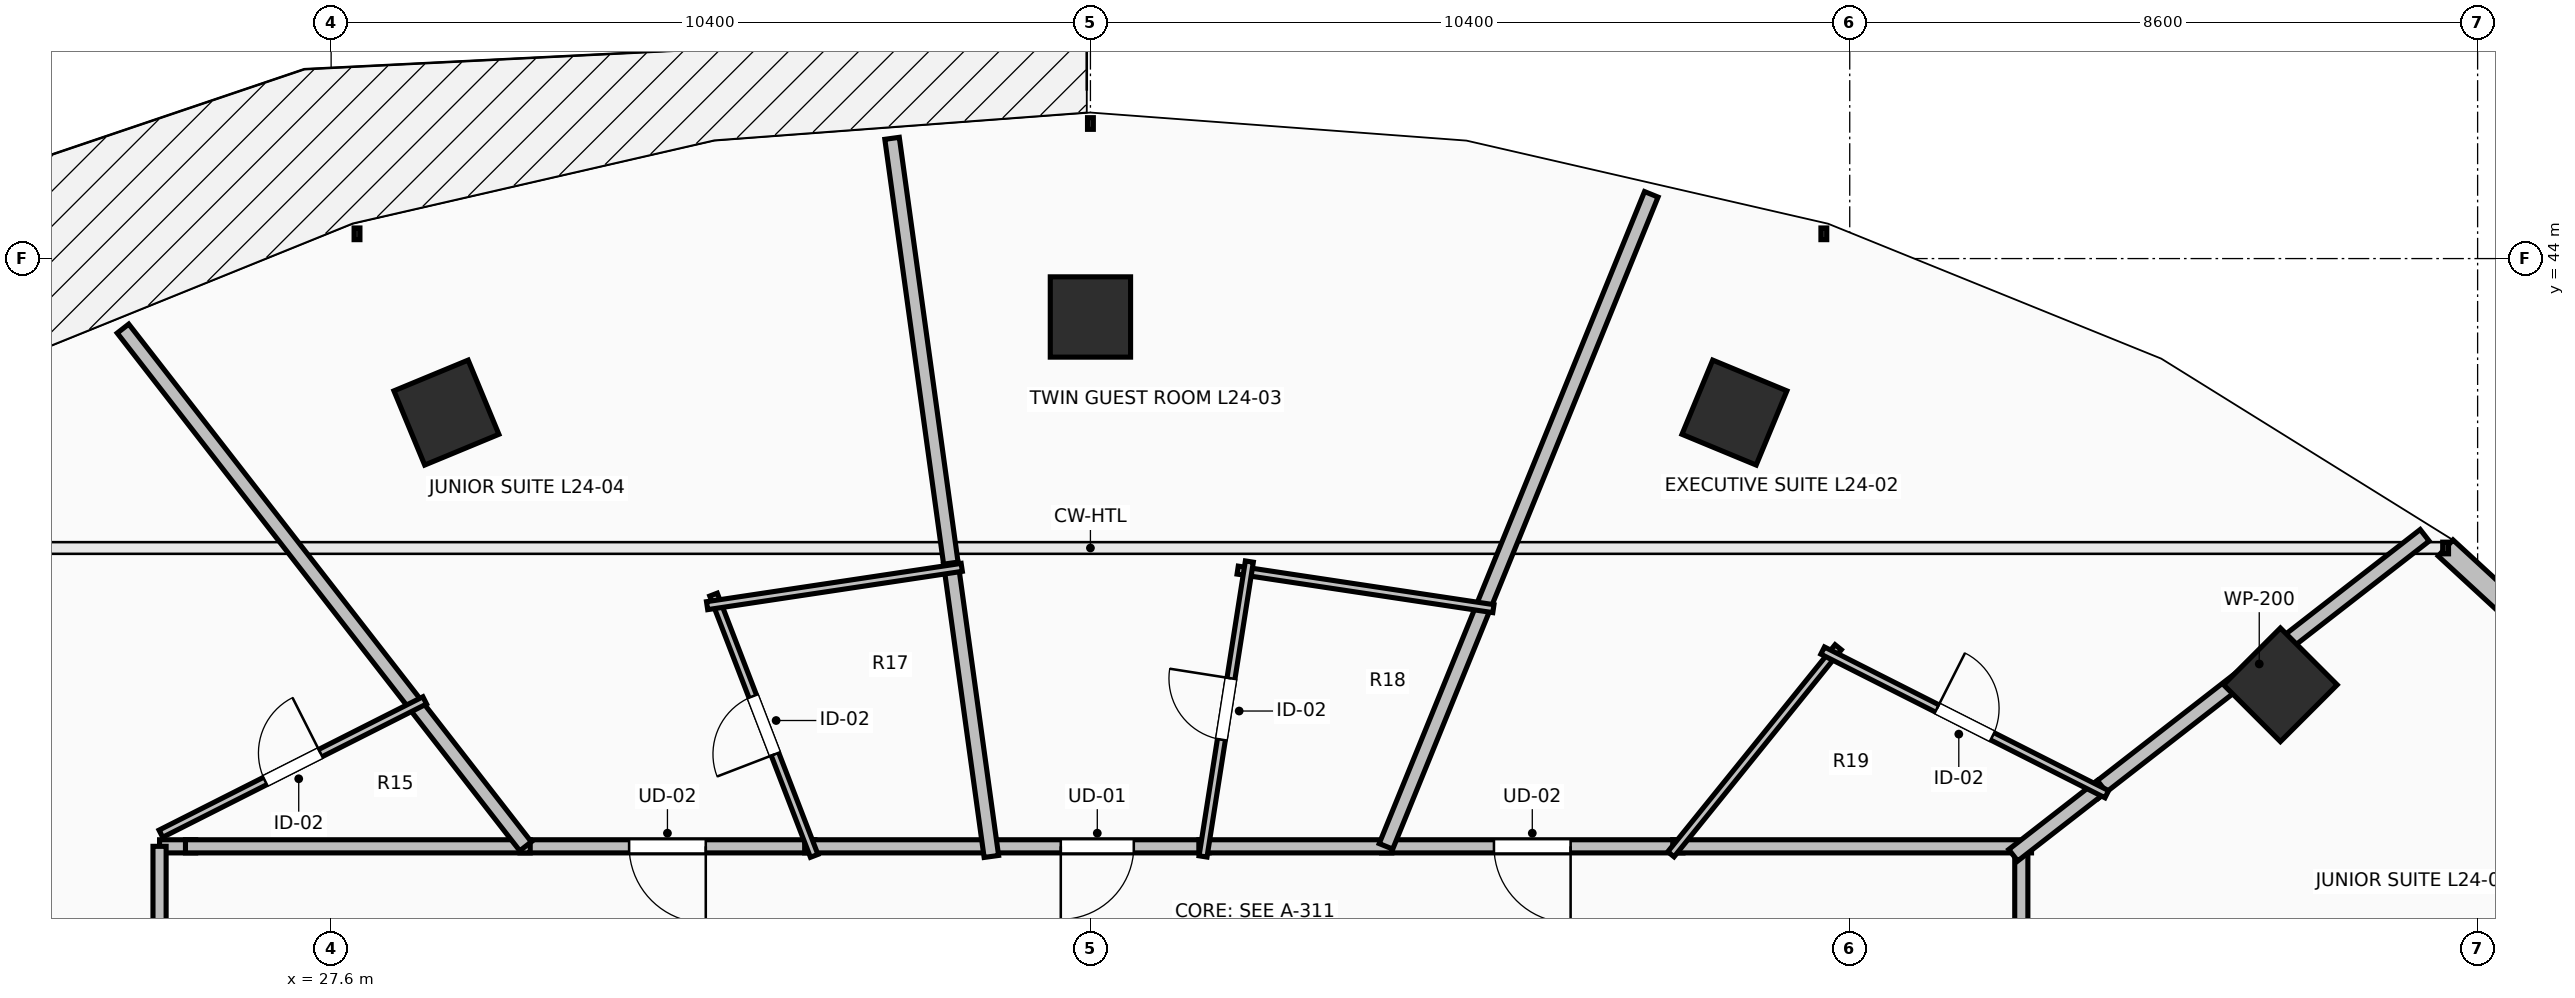
"""IFC4 building model, lengths in metres.
Left out: names, types, materials, properties, quantities, classifications, styles, units other than length and angle.
Written with IfcOpenShell. Run it as: python <this file> out.ifc"""

import sys

from ifc_helpers import new_model, si_unit, direction, frame, frame_2d, origin, origin_2d, place, context, subcontext, project, spatial, rectangle, extrude, element, fill, save


model = new_model("IFC4")
c1 = context("Model", 3, precision=1e-05, world=origin(), true_north=direction((0.0, 1.0)))
c2 = subcontext(c1, "Body", "Model", "MODEL_VIEW")
j1 = project(units=[si_unit("LENGTHUNIT", "METRE"), si_unit("PLANEANGLEUNIT", "RADIAN")], contexts=[c1])
p1 = place(None, origin())
s1 = spatial("IfcSite", under=j1, at=p1, CompositionType="ELEMENT")
p2 = place(p1, origin())
s2 = spatial("IfcBuilding", under=s1, at=p2, CompositionType="ELEMENT")
p3 = place(p2, frame((0.0, 0.0, 92.8)))
s3 = spatial("IfcBuildingStorey", under=s2, at=p3, CompositionType="ELEMENT", Elevation=92.8)
for number, where, z_axis, x_axis in (
    (1, (54.299, 38.162, 0.0), (0.0, 0.0, 1.0), (0.707, 0.707, 0.0)),
    (2, (46.821, 41.891, 0.0), (0.0, 0.0, 1.0), (0.383, 0.924, 0.0)),
    (3, (38.0, 43.2, 0.0), (0.0, 0.0, 1.0), (0.0, 1.0, 0.0)),
    (4, (29.179, 41.891, 0.0), (0.0, 0.0, 1.0), (-0.383, 0.924, 0.0)),
):
    element("IfcColumn", number, at=place(p3, frame(where, z_axis=z_axis, x_axis=x_axis)), inside=s3, PredefinedType="COLUMN", context=c2, shape_type="SweptSolid", body=[
        extrude(rectangle(XDim=1.1, YDim=1.1, at=origin_2d()), origin(), (0.0, 0.0, 1.0), 3.5),
    ])
p4 = place(p3, frame((59.826, 37.028, 0.0), z_axis=(0.0, 0.0, 1.0), x_axis=(-0.735416718093, 0.677615119924, 0.0)))
e5 = element("IfcWall", 5, at=p4, inside=s3, PredefinedType="STANDARD", context=c2, shape_type="SweptSolid", body=[
    extrude(rectangle(XDim=4.439, YDim=0.3, at=frame_2d((2.22, 0.0))), origin(), (0.0, 0.0, 1.0), 3.24),
])
p5 = place(p4, frame((1.32, 0.0, 0.85)))
e6 = element("IfcOpeningElement", 6, at=p5, cuts=e5, PredefinedType="OPENING", context=c2, shape_type="SweptSolid", body=[
    extrude(rectangle(XDim=1.8, YDim=2.19, at=frame_2d((0.9, 1.095))), frame((0.0, 0.165, 0.0), z_axis=(0.0, -1.0, 0.0), x_axis=(1.0, 0.0, 0.0)), (0.0, 0.0, 1.0), 0.33),
])
p6 = place(p3, frame((50.75, 30.853, 0.0), z_axis=(0.0, 0.0, 1.0), x_axis=(0.0, 1.0, 0.0)))
e7 = element("IfcWall", 7, at=p6, inside=s3, PredefinedType="PARTITIONING", context=c2, shape_type="SweptSolid", body=[
    extrude(rectangle(XDim=5.097, YDim=0.18, at=frame_2d((2.548, 0.0))), origin(), (0.0, 0.0, 1.0), 2.432),
])
p7 = place(p6, frame((2.023, 0.0, 0.0)))
e8 = element("IfcOpeningElement", 8, at=p7, cuts=e7, PredefinedType="OPENING", context=c2, shape_type="SweptSolid", body=[
    extrude(rectangle(XDim=1.05, YDim=2.2, at=frame_2d((0.525, 1.1))), frame((0.0, 0.105, 0.0), z_axis=(0.0, -1.0, 0.0), x_axis=(1.0, 0.0, 0.0)), (0.0, 0.0, 1.0), 0.21),
])
p8 = place(p3, frame((46.116, 35.95, 0.0), z_axis=(0.0, 0.0, 1.0), x_axis=(-1.0, 0.0, 0.0)))
e9 = element("IfcWall", 9, at=p8, inside=s3, PredefinedType="PARTITIONING", context=c2, shape_type="SweptSolid", body=[
    extrude(rectangle(XDim=4.128, YDim=0.18, at=frame_2d((2.064, 0.0))), origin(), (0.0, 0.0, 1.0), 2.972),
])
p9 = place(p8, frame((1.539, 0.0, 0.0)))
e10 = element("IfcOpeningElement", 10, at=p9, cuts=e9, PredefinedType="OPENING", context=c2, shape_type="SweptSolid", body=[
    extrude(rectangle(XDim=1.05, YDim=2.2, at=frame_2d((0.525, 1.1))), frame((0.0, 0.105, 0.0), z_axis=(0.0, -1.0, 0.0), x_axis=(1.0, 0.0, 0.0)), (0.0, 0.0, 1.0), 0.21),
])
p10 = place(p3, frame((50.89, 35.95, 0.0), z_axis=(0.0, 0.0, 1.0), x_axis=(-1.0, 0.0, 0.0)))
e11 = element("IfcWall", 11, at=p10, inside=s3, PredefinedType="PARTITIONING", context=c2, shape_type="SweptSolid", body=[
    extrude(rectangle(XDim=4.914, YDim=0.18, at=frame_2d((2.457, 0.0))), origin(), (0.0, 0.0, 1.0), 2.432),
])
p11 = place(p3, frame((39.625, 35.95, 0.0), z_axis=(0.0, 0.0, 1.0), x_axis=(-1.0, 0.0, 0.0)))
e12 = element("IfcWall", 12, at=p11, inside=s3, PredefinedType="PARTITIONING", context=c2, shape_type="SweptSolid", body=[
    extrude(rectangle(XDim=3.062, YDim=0.18, at=frame_2d((1.531, 0.0))), origin(), (0.0, 0.0, 1.0), 2.972),
])
p12 = place(p11, frame((1.031, 0.0, 0.0)))
e13 = element("IfcOpeningElement", 13, at=p12, cuts=e12, PredefinedType="OPENING", context=c2, shape_type="SweptSolid", body=[
    extrude(rectangle(XDim=1.0, YDim=2.15, at=frame_2d((0.5, 1.075))), frame((0.0, 0.105, 0.0), z_axis=(0.0, -1.0, 0.0), x_axis=(1.0, 0.0, 0.0)), (0.0, 0.0, 1.0), 0.21),
])
p13 = place(p3, frame((42.128, 35.95, 0.0), z_axis=(0.0, 0.0, 1.0), x_axis=(-1.0, 0.0, 0.0)))
e14 = element("IfcWall", 14, at=p13, inside=s3, PredefinedType="PARTITIONING", context=c2, shape_type="SweptSolid", body=[
    extrude(rectangle(XDim=2.643, YDim=0.18, at=frame_2d((1.321, 0.0))), origin(), (0.0, 0.0, 1.0), 2.972),
])
p14 = place(p3, frame((34.226, 35.95, 0.0), z_axis=(0.0, 0.0, 1.0), x_axis=(-1.0, 0.0, 0.0)))
e15 = element("IfcWall", 15, at=p14, inside=s3, PredefinedType="PARTITIONING", context=c2, shape_type="SweptSolid", body=[
    extrude(rectangle(XDim=4.039, YDim=0.18, at=frame_2d((2.02, 0.0))), origin(), (0.0, 0.0, 1.0), 2.432),
])
p15 = place(p14, frame((1.494, 0.0, 0.0)))
e16 = element("IfcOpeningElement", 16, at=p15, cuts=e15, PredefinedType="OPENING", context=c2, shape_type="SweptSolid", body=[
    extrude(rectangle(XDim=1.05, YDim=2.2, at=frame_2d((0.525, 1.1))), frame((0.0, 0.105, 0.0), z_axis=(0.0, -1.0, 0.0), x_axis=(1.0, 0.0, 0.0)), (0.0, 0.0, 1.0), 0.21),
])
p16 = place(p3, frame((36.703, 35.95, 0.0), z_axis=(0.0, 0.0, 1.0), x_axis=(-1.0, 0.0, 0.0)))
e17 = element("IfcWall", 17, at=p16, inside=s3, PredefinedType="PARTITIONING", context=c2, shape_type="SweptSolid", body=[
    extrude(rectangle(XDim=2.617, YDim=0.18, at=frame_2d((1.309, 0.0))), origin(), (0.0, 0.0, 1.0), 2.972),
])
p17 = place(p3, frame((25.745, 35.95, 0.0), z_axis=(0.0, 0.0, 1.0), x_axis=(-1.0, 0.0, 0.0)))
e18 = element("IfcWall", 18, at=p17, inside=s3, PredefinedType="PARTITIONING", context=c2, shape_type="SweptSolid", body=[
    extrude(rectangle(XDim=0.495, YDim=0.18, at=frame_2d((0.248, 0.0))), origin(), (0.0, 0.0, 1.0), 3.24),
])
p18 = place(p3, frame((25.25, 35.95, 0.0), z_axis=(0.0, 0.0, 1.0), x_axis=(0.0, -1.0, 0.0)))
e19 = element("IfcWall", 19, at=p18, inside=s3, PredefinedType="PARTITIONING", context=c2, shape_type="SweptSolid", body=[
    extrude(rectangle(XDim=4.822, YDim=0.18, at=frame_2d((2.411, 0.0))), origin(), (0.0, 0.0, 1.0), 2.432),
])
p19 = place(p18, frame((1.886, 0.0, 0.0)))
e20 = element("IfcOpeningElement", 20, at=p19, cuts=e19, PredefinedType="OPENING", context=c2, shape_type="SweptSolid", body=[
    extrude(rectangle(XDim=1.05, YDim=2.2, at=frame_2d((0.525, 1.1))), frame((0.0, 0.105, 0.0), z_axis=(0.0, -1.0, 0.0), x_axis=(1.0, 0.0, 0.0)), (0.0, 0.0, 1.0), 0.21),
])
p20 = place(p3, frame((30.327, 35.95, 0.0), z_axis=(0.0, 0.0, 1.0), x_axis=(-1.0, 0.0, 0.0)))
e21 = element("IfcWall", 21, at=p20, inside=s3, PredefinedType="PARTITIONING", context=c2, shape_type="SweptSolid", body=[
    extrude(rectangle(XDim=4.722, YDim=0.18, at=frame_2d((2.361, 0.0))), origin(), (0.0, 0.0, 1.0), 2.432),
])
p21 = place(p3, frame((56.275, 40.21, 0.0), z_axis=(0.0, 0.0, 1.0), x_axis=(-0.78943235806, -0.613837561614, 0.0)))
e22 = element("IfcWall", 22, at=p21, inside=s3, PredefinedType="PARTITIONING", context=c2, shape_type="SweptSolid", body=[
    extrude(rectangle(XDim=5.741, YDim=0.2, at=frame_2d((2.87, 0.0))), origin(), (0.0, 0.0, 1.0), 2.677),
])
p22 = place(p3, frame((51.854, 36.772, 0.0), z_axis=(0.0, 0.0, 1.0), x_axis=(-0.789420593357, -0.613852691436, 0.0)))
e23 = element("IfcWall", 23, at=p22, inside=s3, PredefinedType="PARTITIONING", context=c2, shape_type="SweptSolid", body=[
    extrude(rectangle(XDim=1.538, YDim=0.2, at=frame_2d((0.769, 0.0))), origin(), (0.0, 0.0, 1.0), 2.922),
])
p23 = place(p3, frame((45.951, 35.841, 0.0), z_axis=(0.0, 0.0, 1.0), x_axis=(0.628411924203, 0.77788074505, 0.0)))
e24 = element("IfcWall", 24, at=p23, inside=s3, PredefinedType="PARTITIONING", context=c2, shape_type="SweptSolid", body=[
    extrude(rectangle(XDim=3.646, YDim=0.11, at=frame_2d((1.823, 0.0))), origin(), (0.0, 0.0, 1.0), 2.432),
])
p24 = place(p3, frame((48.029, 38.631, 0.0), z_axis=(0.0, 0.0, 1.0), x_axis=(0.892459125519, -0.451128262558, 0.0)))
e25 = element("IfcWall", 25, at=p24, inside=s3, PredefinedType="PARTITIONING", context=c2, shape_type="SweptSolid", body=[
    extrude(rectangle(XDim=4.361, YDim=0.11, at=frame_2d((2.18, 0.0))), origin(), (0.0, 0.0, 1.0), 3.24),
])
p25 = place(p24, frame((1.755, 0.0, 0.0)))
e26 = element("IfcOpeningElement", 26, at=p25, cuts=e25, PredefinedType="OPENING", context=c2, shape_type="SweptSolid", body=[
    extrude(rectangle(XDim=0.85, YDim=2.1, at=frame_2d((0.425, 1.05))), frame((0.0, 0.07, 0.0), z_axis=(0.0, -1.0, 0.0), x_axis=(1.0, 0.0, 0.0)), (0.0, 0.0, 1.0), 0.14),
])
p26 = place(p3, frame((45.682, 44.88, 0.0), z_axis=(0.0, 0.0, 1.0), x_axis=(-0.376911553655, -0.9262492541, 0.0)))
e27 = element("IfcWall", 27, at=p26, inside=s3, PredefinedType="PARTITIONING", context=c2, shape_type="SweptSolid", body=[
    extrude(rectangle(XDim=9.641, YDim=0.2, at=frame_2d((4.82, 0.0))), origin(), (0.0, 0.0, 1.0), 2.677),
])
p27 = place(p3, frame((40.017, 39.733, 0.0), z_axis=(0.0, 0.0, 1.0), x_axis=(0.988835521732, -0.149011110196, 0.0)))
e28 = element("IfcWall", 28, at=p27, inside=s3, PredefinedType="PARTITIONING", context=c2, shape_type="SweptSolid", body=[
    extrude(rectangle(XDim=3.542, YDim=0.11, at=frame_2d((1.771, 0.0))), origin(), (0.0, 0.0, 1.0), 3.24),
])
p28 = place(p3, frame((39.542, 35.812, 0.0), z_axis=(0.0, 0.0, 1.0), x_axis=(0.155211191462, 0.98788131172, 0.0)))
e29 = element("IfcWall", 29, at=p28, inside=s3, PredefinedType="PARTITIONING", context=c2, shape_type="SweptSolid", body=[
    extrude(rectangle(XDim=4.088, YDim=0.11, at=frame_2d((2.044, 0.0))), origin(), (0.0, 0.0, 1.0), 2.922),
])
p29 = place(p28, frame((1.619, 0.0, 0.0)))
e30 = element("IfcOpeningElement", 30, at=p29, cuts=e29, PredefinedType="OPENING", context=c2, shape_type="SweptSolid", body=[
    extrude(rectangle(XDim=0.85, YDim=2.1, at=frame_2d((0.425, 1.05))), frame((0.0, 0.07, 0.0), z_axis=(0.0, -1.0, 0.0), x_axis=(1.0, 0.0, 0.0)), (0.0, 0.0, 1.0), 0.14),
])
p30 = place(p3, frame((35.283, 45.647, 0.0), z_axis=(0.0, 0.0, 1.0), x_axis=(0.137015172239, -0.990568948926, 0.0)))
e31 = element("IfcWall", 31, at=p30, inside=s3, PredefinedType="PARTITIONING", context=c2, shape_type="SweptSolid", body=[
    extrude(rectangle(XDim=6.014, YDim=0.2, at=frame_2d((3.007, 0.0))), origin(), (0.0, 0.0, 1.0), 2.432),
])
p31 = place(p3, frame((36.087, 39.829, 0.0), z_axis=(0.0, 0.0, 1.0), x_axis=(0.137071274589, -0.990561187248, 0.0)))
e32 = element("IfcWall", 32, at=p31, inside=s3, PredefinedType="PARTITIONING", context=c2, shape_type="SweptSolid", body=[
    extrude(rectangle(XDim=4.056, YDim=0.2, at=frame_2d((2.028, 0.0))), origin(), (0.0, 0.0, 1.0), 2.922),
])
p32 = place(p3, frame((34.216, 35.819, 0.0), z_axis=(0.0, 0.0, 1.0), x_axis=(-0.359516562862, 0.933138704067, 0.0)))
e33 = element("IfcWall", 33, at=p32, inside=s3, PredefinedType="PARTITIONING", context=c2, shape_type="SweptSolid", body=[
    extrude(rectangle(XDim=3.835, YDim=0.11, at=frame_2d((1.917, 0.0))), origin(), (0.0, 0.0, 1.0), 2.432),
])
p33 = place(p32, frame((1.492, 0.0, 0.0)))
e34 = element("IfcOpeningElement", 34, at=p33, cuts=e33, PredefinedType="OPENING", context=c2, shape_type="SweptSolid", body=[
    extrude(rectangle(XDim=0.85, YDim=2.1, at=frame_2d((0.425, 1.05))), frame((0.0, 0.07, 0.0), z_axis=(0.0, -1.0, 0.0), x_axis=(1.0, 0.0, 0.0)), (0.0, 0.0, 1.0), 0.14),
])
p34 = place(p3, frame((32.75, 39.246, 0.0), z_axis=(0.0, 0.0, 1.0), x_axis=(0.988874324222, 0.148753389525, 0.0)))
e35 = element("IfcWall", 35, at=p34, inside=s3, PredefinedType="PARTITIONING", context=c2, shape_type="SweptSolid", body=[
    extrude(rectangle(XDim=3.527, YDim=0.11, at=frame_2d((1.764, 0.0))), origin(), (0.0, 0.0, 1.0), 2.432),
])
p35 = place(p3, frame((24.749, 43.041, 0.0), z_axis=(0.0, 0.0, 1.0), x_axis=(0.61384652665, -0.789425387051, 0.0)))
e36 = element("IfcWall", 36, at=p35, inside=s3, PredefinedType="PARTITIONING", context=c2, shape_type="SweptSolid", body=[
    extrude(rectangle(XDim=8.983, YDim=0.2, at=frame_2d((4.491, 0.0))), origin(), (0.0, 0.0, 1.0), 2.432),
])
p36 = place(p3, frame((25.268, 36.123, 0.0), z_axis=(0.0, 0.0, 1.0), x_axis=(0.892501687321, 0.451044053425, 0.0)))
e37 = element("IfcWall", 37, at=p36, inside=s3, PredefinedType="PARTITIONING", context=c2, shape_type="SweptSolid", body=[
    extrude(rectangle(XDim=4.049, YDim=0.11, at=frame_2d((2.025, 0.0))), origin(), (0.0, 0.0, 1.0), 2.432),
])
p37 = place(p36, frame((1.6, 0.0, 0.0)))
e38 = element("IfcOpeningElement", 38, at=p37, cuts=e37, PredefinedType="OPENING", context=c2, shape_type="SweptSolid", body=[
    extrude(rectangle(XDim=0.85, YDim=2.1, at=frame_2d((0.425, 1.05))), frame((0.0, 0.07, 0.0), z_axis=(0.0, -1.0, 0.0), x_axis=(1.0, 0.0, 0.0)), (0.0, 0.0, 1.0), 0.14),
])
p38 = place(p3, frame((14.997, 35.359, 0.0), z_axis=(0.0, 0.0, 1.0), x_axis=(0.926288615834, -0.376814808861, 0.0)))
e39 = element("IfcWall", 39, at=p38, inside=s3, PredefinedType="PARTITIONING", context=c2, shape_type="SweptSolid", body=[
    extrude(rectangle(XDim=11.069, YDim=0.2, at=frame_2d((5.534, 0.0))), origin(), (0.0, 0.0, 1.0), 2.677),
])
p39 = place(p9, origin())
e40 = element("IfcDoor", 40, at=p39, inside=s3, OperationType="SINGLE_SWING_LEFT", PredefinedType="DOOR", context=c2, shape_type="SweptSolid", body=[
    extrude(rectangle(XDim=1.05, YDim=2.2, at=frame_2d((0.525, 1.1))), frame((0.0, 0.025, 0.0), z_axis=(0.0, -1.0, 0.0), x_axis=(1.0, 0.0, 0.0)), (0.0, 0.0, 1.0), 0.05),
])
fill(e10, e40)
p40 = place(p12, origin())
e41 = element("IfcDoor", 41, at=p40, inside=s3, OperationType="SINGLE_SWING_RIGHT", PredefinedType="DOOR", context=c2, shape_type="SweptSolid", body=[
    extrude(rectangle(XDim=1.0, YDim=2.15, at=frame_2d((0.5, 1.075))), frame((0.0, 0.025, 0.0), z_axis=(0.0, -1.0, 0.0), x_axis=(1.0, 0.0, 0.0)), (0.0, 0.0, 1.0), 0.05),
])
fill(e13, e41)
p41 = place(p15, origin())
e42 = element("IfcDoor", 42, at=p41, inside=s3, OperationType="SINGLE_SWING_LEFT", PredefinedType="DOOR", context=c2, shape_type="SweptSolid", body=[
    extrude(rectangle(XDim=1.05, YDim=2.2, at=frame_2d((0.525, 1.1))), frame((0.0, 0.025, 0.0), z_axis=(0.0, -1.0, 0.0), x_axis=(1.0, 0.0, 0.0)), (0.0, 0.0, 1.0), 0.05),
])
fill(e16, e42)
p42 = place(p25, origin())
e43 = element("IfcDoor", 43, at=p42, inside=s3, OperationType="SINGLE_SWING_LEFT", PredefinedType="DOOR", context=c2, shape_type="SweptSolid", body=[
    extrude(rectangle(XDim=0.85, YDim=2.1, at=frame_2d((0.425, 1.05))), frame((0.0, 0.025, 0.0), z_axis=(0.0, -1.0, 0.0), x_axis=(1.0, 0.0, 0.0)), (0.0, 0.0, 1.0), 0.05),
])
fill(e26, e43)
p43 = place(p29, origin())
e44 = element("IfcDoor", 44, at=p43, inside=s3, OperationType="SINGLE_SWING_RIGHT", PredefinedType="DOOR", context=c2, shape_type="SweptSolid", body=[
    extrude(rectangle(XDim=0.85, YDim=2.1, at=frame_2d((0.425, 1.05))), frame((0.0, 0.025, 0.0), z_axis=(0.0, -1.0, 0.0), x_axis=(1.0, 0.0, 0.0)), (0.0, 0.0, 1.0), 0.05),
])
fill(e30, e44)
p44 = place(p33, origin())
e45 = element("IfcDoor", 45, at=p44, inside=s3, OperationType="SINGLE_SWING_LEFT", PredefinedType="DOOR", context=c2, shape_type="SweptSolid", body=[
    extrude(rectangle(XDim=0.85, YDim=2.1, at=frame_2d((0.425, 1.05))), frame((0.0, 0.025, 0.0), z_axis=(0.0, -1.0, 0.0), x_axis=(1.0, 0.0, 0.0)), (0.0, 0.0, 1.0), 0.05),
])
fill(e34, e45)
p45 = place(p37, origin())
e46 = element("IfcDoor", 46, at=p45, inside=s3, OperationType="SINGLE_SWING_RIGHT", PredefinedType="DOOR", context=c2, shape_type="SweptSolid", body=[
    extrude(rectangle(XDim=0.85, YDim=2.1, at=frame_2d((0.425, 1.05))), frame((0.0, 0.025, 0.0), z_axis=(0.0, -1.0, 0.0), x_axis=(1.0, 0.0, 0.0)), (0.0, 0.0, 1.0), 0.05),
])
fill(e38, e46)
save(model, sys.argv[1])
